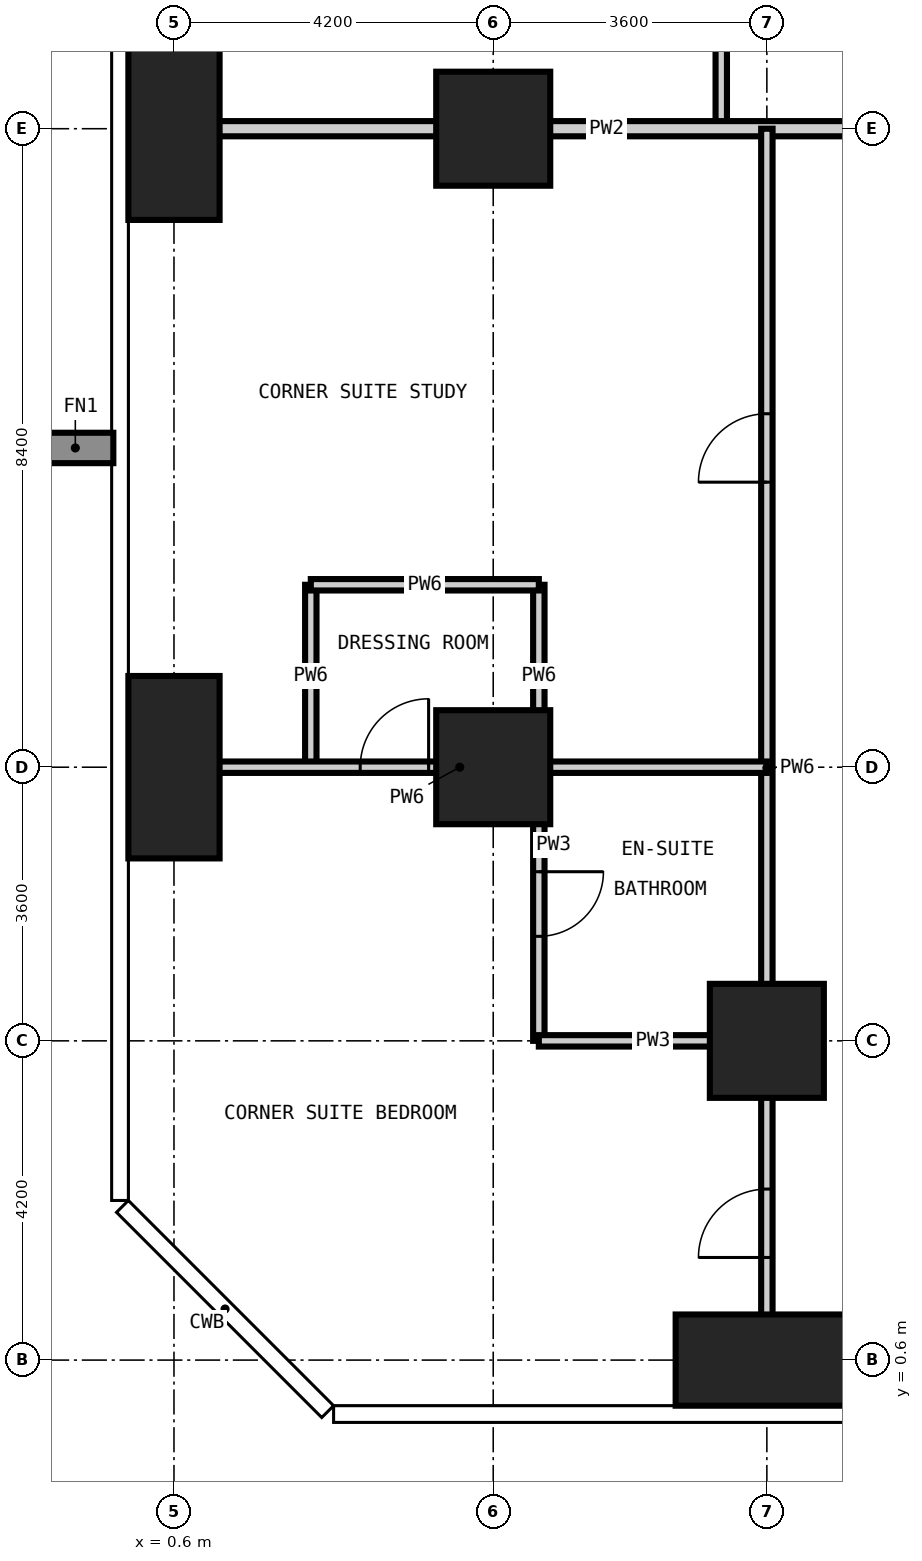
"""IFC4 building model, lengths in metres.
Left out: names, types, materials, properties, quantities, classifications, styles, units other than length and angle.
Written with IfcOpenShell. Run it as: python <this file> out.ifc"""

import sys

from ifc_helpers import new_model, si_unit, direction, frame, frame_2d, origin, origin_2d, place, context, subcontext, project, spatial, rectangle, extrude, element, fill, save


model = new_model("IFC4")
c1 = context("Model", 3, precision=1e-05, world=origin(), true_north=direction((0.0, 1.0)))
c2 = subcontext(c1, "Body", "Model", "MODEL_VIEW")
j1 = project(units=[si_unit("LENGTHUNIT", "METRE"), si_unit("PLANEANGLEUNIT", "RADIAN")], contexts=[c1])
p1 = place(None, origin())
s1 = spatial("IfcSite", under=j1, at=p1, CompositionType="ELEMENT")
p2 = place(p1, origin())
s2 = spatial("IfcBuilding", under=s1, at=p2, CompositionType="ELEMENT")
p3 = place(p2, frame((0.0, 0.0, 133.2)))
s3 = spatial("IfcBuildingStorey", under=s2, at=p3, CompositionType="ELEMENT", Elevation=133.2)
for number, where, z_axis, x_axis in (
    (1, (0.6, 8.4, -0.35), (0.0, 0.0, 1.0), (1.0, 0.0, 0.0)),
    (2, (0.6, 16.8, -0.35), (0.0, 0.0, 1.0), (1.0, 0.0, 0.0)),
):
    element("IfcColumn", number, at=place(p3, frame(where, z_axis=z_axis, x_axis=x_axis)), inside=s3, PredefinedType="COLUMN", context=c2, shape_type="SweptSolid", body=[
        extrude(rectangle(XDim=1.2, YDim=2.4, at=origin_2d()), origin(), (0.0, 0.0, 1.0), 3.6),
    ])
for number, where, z_axis, x_axis in (
    (3, (4.8, 8.4, -0.35), (0.0, 0.0, 1.0), (1.0, 0.0, 0.0)),
    (4, (4.8, 16.8, -0.35), (0.0, 0.0, 1.0), (1.0, 0.0, 0.0)),
):
    element("IfcColumn", number, at=place(p3, frame(where, z_axis=z_axis, x_axis=x_axis)), inside=s3, PredefinedType="COLUMN", context=c2, shape_type="SweptSolid", body=[
        extrude(rectangle(XDim=1.5, YDim=1.5, at=origin_2d()), origin(), (0.0, 0.0, 1.0), 3.6),
    ])
p4 = place(p3, frame((8.4, 0.6, -0.35), z_axis=(0.0, 0.0, 1.0), x_axis=(1.0, 0.0, 0.0)))
e5 = element("IfcColumn", 5, at=p4, inside=s3, PredefinedType="COLUMN", context=c2, shape_type="SweptSolid", body=[
    extrude(rectangle(XDim=2.4, YDim=1.2, at=origin_2d()), origin(), (0.0, 0.0, 1.0), 3.6),
])
p5 = place(p3, frame((8.4, 4.8, -0.35), z_axis=(0.0, 0.0, 1.0), x_axis=(1.0, 0.0, 0.0)))
e6 = element("IfcColumn", 6, at=p5, inside=s3, PredefinedType="COLUMN", context=c2, shape_type="SweptSolid", body=[
    extrude(rectangle(XDim=1.5, YDim=1.5, at=origin_2d()), origin(), (0.0, 0.0, 1.0), 3.6),
])
p6 = place(p3, frame((5.4, 4.8, 0.0), z_axis=(0.0, 0.0, 1.0), x_axis=(0.0, 1.0, 0.0)))
e7 = element("IfcWall", 7, at=p6, inside=s3, PredefinedType="PARTITIONING", context=c2, shape_type="SweptSolid", body=[
    extrude(rectangle(XDim=3.6, YDim=0.15, at=frame_2d((1.8, 0.0))), origin(), (0.0, 0.0, 1.0), 3.25),
])
p7 = place(p6, frame((1.375, 0.0, 0.0)))
e8 = element("IfcOpeningElement", 8, at=p7, cuts=e7, PredefinedType="OPENING", context=c2, shape_type="SweptSolid", body=[
    extrude(rectangle(XDim=0.85, YDim=2.1, at=frame_2d((0.425, 1.05))), frame((0.0, 0.085, 0.0), z_axis=(0.0, -1.0, 0.0), x_axis=(1.0, 0.0, 0.0)), (0.0, 0.0, 1.0), 0.17),
])
p8 = place(p3, frame((7.8, 16.8, 0.0), z_axis=(0.0, 0.0, 1.0), x_axis=(0.0, 1.0, 0.0)))
e9 = element("IfcWall", 9, at=p8, inside=s3, PredefinedType="PARTITIONING", context=c2, shape_type="SweptSolid", body=[
    extrude(rectangle(XDim=2.7, YDim=0.15, at=frame_2d((1.35, 0.0))), origin(), (0.0, 0.0, 1.0), 3.25),
])
p9 = place(p3, frame((5.4, 4.8, 0.0), z_axis=(0.0, 0.0, 1.0), x_axis=(1.0, 0.0, 0.0)))
e10 = element("IfcWall", 10, at=p9, inside=s3, PredefinedType="PARTITIONING", context=c2, shape_type="SweptSolid", body=[
    extrude(rectangle(XDim=3.0, YDim=0.15, at=frame_2d((1.5, 0.0))), origin(), (0.0, 0.0, 1.0), 3.25),
])
p10 = place(p3, frame((-0.018, 16.8, 0.0), z_axis=(0.0, 0.0, 1.0), x_axis=(1.0, 0.0, 0.0)))
e11 = element("IfcWall", 11, at=p10, inside=s3, PredefinedType="PARTITIONING", context=c2, shape_type="SweptSolid", body=[
    extrude(rectangle(XDim=12.618, YDim=0.2, at=frame_2d((6.309, 0.0))), origin(), (0.0, 0.0, 1.0), 3.25),
])
for number, where, z_axis, x_axis in (
    (12, (2.4, 8.4, 0.0), (0.0, 0.0, 1.0), (0.0, 1.0, 0.0)),
    (13, (5.4, 8.4, 0.0), (0.0, 0.0, 1.0), (0.0, 1.0, 0.0)),
):
    element("IfcWall", number, at=place(p3, frame(where, z_axis=z_axis, x_axis=x_axis)), inside=s3, PredefinedType="PARTITIONING", context=c2, shape_type="SweptSolid", body=[
        extrude(rectangle(XDim=2.4, YDim=0.15, at=frame_2d((1.2, 0.0))), origin(), (0.0, 0.0, 1.0), 3.25),
    ])
p11 = place(p3, frame((8.4, -0.018, 0.0), z_axis=(0.0, 0.0, 1.0), x_axis=(0.0, 1.0, 0.0)))
e14 = element("IfcWall", 14, at=p11, inside=s3, PredefinedType="PARTITIONING", context=c2, shape_type="SweptSolid", body=[
    extrude(rectangle(XDim=16.818, YDim=0.15, at=frame_2d((8.409, 0.0))), origin(), (0.0, 0.0, 1.0), 3.25),
])
p12 = place(p11, frame((1.968, 0.0, 0.0)))
e15 = element("IfcOpeningElement", 15, at=p12, cuts=e14, PredefinedType="OPENING", context=c2, shape_type="SweptSolid", body=[
    extrude(rectangle(XDim=0.9, YDim=2.1, at=frame_2d((0.45, 1.05))), frame((0.0, 0.085, 0.0), z_axis=(0.0, -1.0, 0.0), x_axis=(1.0, 0.0, 0.0)), (0.0, 0.0, 1.0), 0.17),
])
p13 = place(p11, frame((12.168, 0.0, 0.0)))
e16 = element("IfcOpeningElement", 16, at=p13, cuts=e14, PredefinedType="OPENING", context=c2, shape_type="SweptSolid", body=[
    extrude(rectangle(XDim=0.9, YDim=2.1, at=frame_2d((0.45, 1.05))), frame((0.0, 0.085, 0.0), z_axis=(0.0, -1.0, 0.0), x_axis=(1.0, 0.0, 0.0)), (0.0, 0.0, 1.0), 0.17),
])
p14 = place(p3, frame((-0.018, 8.4, 0.0), z_axis=(0.0, 0.0, 1.0), x_axis=(1.0, 0.0, 0.0)))
e17 = element("IfcWall", 17, at=p14, inside=s3, PredefinedType="PARTITIONING", context=c2, shape_type="SweptSolid", body=[
    extrude(rectangle(XDim=8.418, YDim=0.15, at=frame_2d((4.209, 0.0))), origin(), (0.0, 0.0, 1.0), 3.25),
])
p15 = place(p14, frame((3.068, 0.0, 0.0)))
e18 = element("IfcOpeningElement", 18, at=p15, cuts=e17, PredefinedType="OPENING", context=c2, shape_type="SweptSolid", body=[
    extrude(rectangle(XDim=0.9, YDim=2.1, at=frame_2d((0.45, 1.05))), frame((0.0, 0.085, 0.0), z_axis=(0.0, -1.0, 0.0), x_axis=(1.0, 0.0, 0.0)), (0.0, 0.0, 1.0), 0.17),
])
p16 = place(p3, frame((2.4, 10.8, 0.0), z_axis=(0.0, 0.0, 1.0), x_axis=(1.0, 0.0, 0.0)))
e19 = element("IfcWall", 19, at=p16, inside=s3, PredefinedType="PARTITIONING", context=c2, shape_type="SweptSolid", body=[
    extrude(rectangle(XDim=3.0, YDim=0.15, at=frame_2d((1.5, 0.0))), origin(), (0.0, 0.0, 1.0), 3.25),
])
p17 = place(p12, origin())
e20 = element("IfcDoor", 20, at=p17, inside=s3, OperationType="SINGLE_SWING_LEFT", PredefinedType="DOOR", context=c2, shape_type="SweptSolid", body=[
    extrude(rectangle(XDim=0.9, YDim=2.1, at=frame_2d((0.45, 1.05))), frame((0.0, 0.025, 0.0), z_axis=(0.0, -1.0, 0.0), x_axis=(1.0, 0.0, 0.0)), (0.0, 0.0, 1.0), 0.05),
])
fill(e15, e20)
p18 = place(p7, frame((0.85, 0.0, 0.0), z_axis=(0.0, 0.0, 1.0), x_axis=(-1.0, 0.0, 0.0)))
e21 = element("IfcDoor", 21, at=p18, inside=s3, OperationType="SINGLE_SWING_LEFT", PredefinedType="DOOR", context=c2, shape_type="SweptSolid", body=[
    extrude(rectangle(XDim=0.85, YDim=2.1, at=frame_2d((0.425, 1.05))), frame((0.0, 0.025, 0.0), z_axis=(0.0, -1.0, 0.0), x_axis=(1.0, 0.0, 0.0)), (0.0, 0.0, 1.0), 0.05),
])
fill(e8, e21)
p19 = place(p15, origin())
e22 = element("IfcDoor", 22, at=p19, inside=s3, OperationType="SINGLE_SWING_RIGHT", PredefinedType="DOOR", context=c2, shape_type="SweptSolid", body=[
    extrude(rectangle(XDim=0.9, YDim=2.1, at=frame_2d((0.45, 1.05))), frame((0.0, 0.025, 0.0), z_axis=(0.0, -1.0, 0.0), x_axis=(1.0, 0.0, 0.0)), (0.0, 0.0, 1.0), 0.05),
])
fill(e18, e22)
p20 = place(p13, origin())
e23 = element("IfcDoor", 23, at=p20, inside=s3, OperationType="SINGLE_SWING_LEFT", PredefinedType="DOOR", context=c2, shape_type="SweptSolid", body=[
    extrude(rectangle(XDim=0.9, YDim=2.1, at=frame_2d((0.45, 1.05))), frame((0.0, 0.025, 0.0), z_axis=(0.0, -1.0, 0.0), x_axis=(1.0, 0.0, 0.0)), (0.0, 0.0, 1.0), 0.05),
])
fill(e16, e23)
save(model, sys.argv[1])
